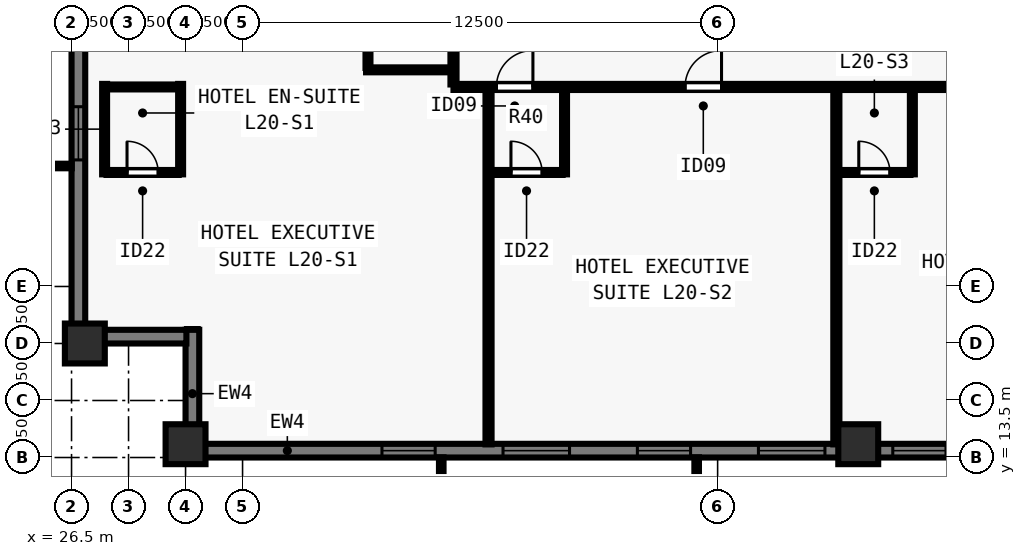
"""IFC4 building model, lengths in metres.
Left out: names, types, materials, properties, quantities, classifications, styles, units other than length and angle.
Written with IfcOpenShell. Run it as: python <this file> out.ifc"""

import sys

from ifc_helpers import new_model, si_unit, direction, frame, frame_2d, origin, origin_2d, place, context, subcontext, project, spatial, rectangle, extrude, element, fill, save


model = new_model("IFC4")
c1 = context("Model", 3, precision=1e-05, world=origin(), true_north=direction((0.0, 1.0)))
c2 = subcontext(c1, "Body", "Model", "MODEL_VIEW")
j1 = project(units=[si_unit("LENGTHUNIT", "METRE"), si_unit("PLANEANGLEUNIT", "RADIAN")], contexts=[c1])
p1 = place(None, origin())
s1 = spatial("IfcSite", under=j1, at=p1, CompositionType="ELEMENT")
p2 = place(p1, origin())
s2 = spatial("IfcBuilding", under=s1, at=p2, CompositionType="ELEMENT")
p3 = place(p2, frame((0.0, 0.0, 76.0)))
s3 = spatial("IfcBuildingStorey", under=s2, at=p3, CompositionType="ELEMENT", Elevation=76.0)
for number, where, z_axis, x_axis in (
    (1, (29.5, 13.85, 0.0), (0.0, 0.0, 1.0), (1.0, 0.0, 0.0)),
    (2, (47.2, 13.85, 0.0), (0.0, 0.0, 1.0), (1.0, 0.0, 0.0)),
    (3, (26.85, 16.5, 0.0), (0.0, 0.0, 1.0), (0.0, 1.0, 0.0)),
):
    element("IfcColumn", number, at=place(p3, frame(where, z_axis=z_axis, x_axis=x_axis)), inside=s3, PredefinedType="COLUMN", context=c2, shape_type="SweptSolid", body=[
        extrude(rectangle(XDim=1.05, YDim=1.05, at=origin_2d()), origin(), (0.0, 0.0, 1.0), 3.5),
    ])
p4 = place(p3, frame((74.5, 13.68, 0.0), z_axis=(0.0, 0.0, 1.0), x_axis=(-1.0, 0.0, 0.0)))
e4 = element("IfcWall", 4, at=p4, inside=s3, PredefinedType="SOLIDWALL", context=c2, shape_type="SweptSolid", body=[
    extrude(rectangle(XDim=44.662, YDim=0.36, at=frame_2d((22.331, 0.0))), origin(), (0.0, 0.0, 1.0), 3.28),
])
p5 = place(p4, frame((4.83, 0.0, 0.8)))
e5 = element("IfcOpeningElement", 5, at=p5, cuts=e4, PredefinedType="OPENING", context=c2, shape_type="SweptSolid", body=[
    extrude(rectangle(XDim=1.4, YDim=1.544, at=frame_2d((0.7, 0.772))), frame((0.0, 0.19, 0.0), z_axis=(0.0, -1.0, 0.0), x_axis=(1.0, 0.0, 0.0)), (0.0, 0.0, 1.0), 0.38),
])
p6 = place(p4, frame((8.465, 0.0, 0.8)))
e6 = element("IfcOpeningElement", 6, at=p6, cuts=e4, PredefinedType="OPENING", context=c2, shape_type="SweptSolid", body=[
    extrude(rectangle(XDim=1.75, YDim=1.544, at=frame_2d((0.875, 0.772))), frame((0.0, 0.19, 0.0), z_axis=(0.0, -1.0, 0.0), x_axis=(1.0, 0.0, 0.0)), (0.0, 0.0, 1.0), 0.38),
])
p7 = place(p4, frame((11.551, 0.0, 0.8)))
e7 = element("IfcOpeningElement", 7, at=p7, cuts=e4, PredefinedType="OPENING", context=c2, shape_type="SweptSolid", body=[
    extrude(rectangle(XDim=1.4, YDim=1.544, at=frame_2d((0.7, 0.772))), frame((0.0, 0.19, 0.0), z_axis=(0.0, -1.0, 0.0), x_axis=(1.0, 0.0, 0.0)), (0.0, 0.0, 1.0), 0.38),
])
p8 = place(p4, frame((14.736, 0.0, 0.8)))
e8 = element("IfcOpeningElement", 8, at=p8, cuts=e4, PredefinedType="OPENING", context=c2, shape_type="SweptSolid", body=[
    extrude(rectangle(XDim=1.75, YDim=1.544, at=frame_2d((0.875, 0.772))), frame((0.0, 0.19, 0.0), z_axis=(0.0, -1.0, 0.0), x_axis=(1.0, 0.0, 0.0)), (0.0, 0.0, 1.0), 0.38),
])
p9 = place(p4, frame((18.721, 0.0, 0.8)))
e9 = element("IfcOpeningElement", 9, at=p9, cuts=e4, PredefinedType="OPENING", context=c2, shape_type="SweptSolid", body=[
    extrude(rectangle(XDim=1.4, YDim=1.544, at=frame_2d((0.7, 0.772))), frame((0.0, 0.19, 0.0), z_axis=(0.0, -1.0, 0.0), x_axis=(1.0, 0.0, 0.0)), (0.0, 0.0, 1.0), 0.38),
])
p10 = place(p4, frame((21.456, 0.0, 0.8)))
e10 = element("IfcOpeningElement", 10, at=p10, cuts=e4, PredefinedType="OPENING", context=c2, shape_type="SweptSolid", body=[
    extrude(rectangle(XDim=1.75, YDim=1.544, at=frame_2d((0.875, 0.772))), frame((0.0, 0.19, 0.0), z_axis=(0.0, -1.0, 0.0), x_axis=(1.0, 0.0, 0.0)), (0.0, 0.0, 1.0), 0.38),
])
p11 = place(p4, frame((24.991, 0.0, 0.8)))
e11 = element("IfcOpeningElement", 11, at=p11, cuts=e4, PredefinedType="OPENING", context=c2, shape_type="SweptSolid", body=[
    extrude(rectangle(XDim=1.4, YDim=1.544, at=frame_2d((0.7, 0.772))), frame((0.0, 0.19, 0.0), z_axis=(0.0, -1.0, 0.0), x_axis=(1.0, 0.0, 0.0)), (0.0, 0.0, 1.0), 0.38),
])
p12 = place(p4, frame((28.177, 0.0, 0.8)))
e12 = element("IfcOpeningElement", 12, at=p12, cuts=e4, PredefinedType="OPENING", context=c2, shape_type="SweptSolid", body=[
    extrude(rectangle(XDim=1.75, YDim=1.544, at=frame_2d((0.875, 0.772))), frame((0.0, 0.19, 0.0), z_axis=(0.0, -1.0, 0.0), x_axis=(1.0, 0.0, 0.0)), (0.0, 0.0, 1.0), 0.38),
])
p13 = place(p4, frame((31.711, 0.0, 0.8)))
e13 = element("IfcOpeningElement", 13, at=p13, cuts=e4, PredefinedType="OPENING", context=c2, shape_type="SweptSolid", body=[
    extrude(rectangle(XDim=1.4, YDim=1.544, at=frame_2d((0.7, 0.772))), frame((0.0, 0.19, 0.0), z_axis=(0.0, -1.0, 0.0), x_axis=(1.0, 0.0, 0.0)), (0.0, 0.0, 1.0), 0.38),
])
p14 = place(p4, frame((34.897, 0.0, 0.8)))
e14 = element("IfcOpeningElement", 14, at=p14, cuts=e4, PredefinedType="OPENING", context=c2, shape_type="SweptSolid", body=[
    extrude(rectangle(XDim=1.75, YDim=1.544, at=frame_2d((0.875, 0.772))), frame((0.0, 0.19, 0.0), z_axis=(0.0, -1.0, 0.0), x_axis=(1.0, 0.0, 0.0)), (0.0, 0.0, 1.0), 0.38),
])
p15 = place(p4, frame((38.432, 0.0, 0.8)))
e15 = element("IfcOpeningElement", 15, at=p15, cuts=e4, PredefinedType="OPENING", context=c2, shape_type="SweptSolid", body=[
    extrude(rectangle(XDim=1.4, YDim=1.544, at=frame_2d((0.7, 0.772))), frame((0.0, 0.19, 0.0), z_axis=(0.0, -1.0, 0.0), x_axis=(1.0, 0.0, 0.0)), (0.0, 0.0, 1.0), 0.38),
])
p16 = place(p3, frame((29.68, 13.5, 0.0), z_axis=(0.0, 0.0, 1.0), x_axis=(0.0, 1.0, 0.0)))
e16 = element("IfcWall", 16, at=p16, inside=s3, PredefinedType="SOLIDWALL", context=c2, shape_type="SweptSolid", body=[
    extrude(rectangle(XDim=3.36, YDim=0.36, at=frame_2d((1.68, 0.0))), origin(), (0.0, 0.0, 1.0), 3.28),
])
p17 = place(p3, frame((29.522, 16.68, 0.0), z_axis=(0.0, 0.0, 1.0), x_axis=(-1.0, 0.0, 0.0)))
e17 = element("IfcWall", 17, at=p17, inside=s3, PredefinedType="SOLIDWALL", context=c2, shape_type="SweptSolid", body=[
    extrude(rectangle(XDim=2.684, YDim=0.36, at=frame_2d((1.342, 0.0))), origin(), (0.0, 0.0, 1.0), 3.28),
])
p18 = place(p3, frame((26.68, 16.5, 0.0), z_axis=(0.0, 0.0, 1.0), x_axis=(0.0, 1.0, 0.0)))
e18 = element("IfcWall", 18, at=p18, inside=s3, PredefinedType="SOLIDWALL", context=c2, shape_type="SweptSolid", body=[
    extrude(rectangle(XDim=44.662, YDim=0.36, at=frame_2d((22.331, 0.0))), origin(), (0.0, 0.0, 1.0), 3.28),
])
p19 = place(p18, frame((4.83, 0.0, 0.8)))
e19 = element("IfcOpeningElement", 19, at=p19, cuts=e18, PredefinedType="OPENING", context=c2, shape_type="SweptSolid", body=[
    extrude(rectangle(XDim=1.4, YDim=1.544, at=frame_2d((0.7, 0.772))), frame((0.0, 0.19, 0.0), z_axis=(0.0, -1.0, 0.0), x_axis=(1.0, 0.0, 0.0)), (0.0, 0.0, 1.0), 0.38),
])
p20 = place(p18, frame((8.015, 0.0, 0.8)))
e20 = element("IfcOpeningElement", 20, at=p20, cuts=e18, PredefinedType="OPENING", context=c2, shape_type="SweptSolid", body=[
    extrude(rectangle(XDim=1.75, YDim=1.544, at=frame_2d((0.875, 0.772))), frame((0.0, 0.19, 0.0), z_axis=(0.0, -1.0, 0.0), x_axis=(1.0, 0.0, 0.0)), (0.0, 0.0, 1.0), 0.38),
])
p21 = place(p18, frame((11.551, 0.0, 0.8)))
e21 = element("IfcOpeningElement", 21, at=p21, cuts=e18, PredefinedType="OPENING", context=c2, shape_type="SweptSolid", body=[
    extrude(rectangle(XDim=1.4, YDim=1.544, at=frame_2d((0.7, 0.772))), frame((0.0, 0.19, 0.0), z_axis=(0.0, -1.0, 0.0), x_axis=(1.0, 0.0, 0.0)), (0.0, 0.0, 1.0), 0.38),
])
p22 = place(p18, frame((18.721, 0.0, 0.8)))
e22 = element("IfcOpeningElement", 22, at=p22, cuts=e18, PredefinedType="OPENING", context=c2, shape_type="SweptSolid", body=[
    extrude(rectangle(XDim=1.4, YDim=1.544, at=frame_2d((0.7, 0.772))), frame((0.0, 0.19, 0.0), z_axis=(0.0, -1.0, 0.0), x_axis=(1.0, 0.0, 0.0)), (0.0, 0.0, 1.0), 0.38),
])
p23 = place(p18, frame((22.706, 0.0, 0.8)))
e23 = element("IfcOpeningElement", 23, at=p23, cuts=e18, PredefinedType="OPENING", context=c2, shape_type="SweptSolid", body=[
    extrude(rectangle(XDim=1.75, YDim=1.544, at=frame_2d((0.875, 0.772))), frame((0.0, 0.19, 0.0), z_axis=(0.0, -1.0, 0.0), x_axis=(1.0, 0.0, 0.0)), (0.0, 0.0, 1.0), 0.38),
])
p24 = place(p18, frame((24.991, 0.0, 0.8)))
e24 = element("IfcOpeningElement", 24, at=p24, cuts=e18, PredefinedType="OPENING", context=c2, shape_type="SweptSolid", body=[
    extrude(rectangle(XDim=1.4, YDim=1.544, at=frame_2d((0.7, 0.772))), frame((0.0, 0.19, 0.0), z_axis=(0.0, -1.0, 0.0), x_axis=(1.0, 0.0, 0.0)), (0.0, 0.0, 1.0), 0.38),
])
p25 = place(p18, frame((28.177, 0.0, 0.8)))
e25 = element("IfcOpeningElement", 25, at=p25, cuts=e18, PredefinedType="OPENING", context=c2, shape_type="SweptSolid", body=[
    extrude(rectangle(XDim=1.75, YDim=1.544, at=frame_2d((0.875, 0.772))), frame((0.0, 0.19, 0.0), z_axis=(0.0, -1.0, 0.0), x_axis=(1.0, 0.0, 0.0)), (0.0, 0.0, 1.0), 0.38),
])
p26 = place(p18, frame((31.711, 0.0, 0.8)))
e26 = element("IfcOpeningElement", 26, at=p26, cuts=e18, PredefinedType="OPENING", context=c2, shape_type="SweptSolid", body=[
    extrude(rectangle(XDim=1.4, YDim=1.544, at=frame_2d((0.7, 0.772))), frame((0.0, 0.19, 0.0), z_axis=(0.0, -1.0, 0.0), x_axis=(1.0, 0.0, 0.0)), (0.0, 0.0, 1.0), 0.38),
])
p27 = place(p18, frame((34.897, 0.0, 0.8)))
e27 = element("IfcOpeningElement", 27, at=p27, cuts=e18, PredefinedType="OPENING", context=c2, shape_type="SweptSolid", body=[
    extrude(rectangle(XDim=1.75, YDim=1.544, at=frame_2d((0.875, 0.772))), frame((0.0, 0.19, 0.0), z_axis=(0.0, -1.0, 0.0), x_axis=(1.0, 0.0, 0.0)), (0.0, 0.0, 1.0), 0.38),
])
p28 = place(p3, frame((36.55, 23.25, 0.0), z_axis=(0.0, 0.0, 1.0), x_axis=(1.0, 0.0, 0.0)))
e28 = element("IfcWall", 28, at=p28, inside=s3, PredefinedType="PARTITIONING", context=c2, shape_type="SweptSolid", body=[
    extrude(rectangle(XDim=30.9, YDim=0.16, at=frame_2d((15.45, 0.0))), origin(), (0.0, 0.0, 1.0), 3.28),
])
p29 = place(p28, frame((1.13, 0.0, 0.0)))
e29 = element("IfcOpeningElement", 29, at=p29, cuts=e28, PredefinedType="OPENING", context=c2, shape_type="SweptSolid", body=[
    extrude(rectangle(XDim=0.96, YDim=2.15, at=frame_2d((0.48, 1.075))), frame((0.0, 0.09, 0.0), z_axis=(0.0, -1.0, 0.0), x_axis=(1.0, 0.0, 0.0)), (0.0, 0.0, 1.0), 0.18),
])
p30 = place(p28, frame((6.093, 0.0, 0.0)))
e30 = element("IfcOpeningElement", 30, at=p30, cuts=e28, PredefinedType="OPENING", context=c2, shape_type="SweptSolid", body=[
    extrude(rectangle(XDim=0.96, YDim=2.15, at=frame_2d((0.48, 1.075))), frame((0.0, 0.09, 0.0), z_axis=(0.0, -1.0, 0.0), x_axis=(1.0, 0.0, 0.0)), (0.0, 0.0, 1.0), 0.18),
])
p31 = place(p28, frame((16.125, 0.0, 0.0)))
e31 = element("IfcOpeningElement", 31, at=p31, cuts=e28, PredefinedType="OPENING", context=c2, shape_type="SweptSolid", body=[
    extrude(rectangle(XDim=0.96, YDim=2.15, at=frame_2d((0.48, 1.075))), frame((0.0, 0.09, 0.0), z_axis=(0.0, -1.0, 0.0), x_axis=(1.0, 0.0, 0.0)), (0.0, 0.0, 1.0), 0.18),
])
p32 = place(p28, frame((26.157, 0.0, 0.0)))
e32 = element("IfcOpeningElement", 32, at=p32, cuts=e28, PredefinedType="OPENING", context=c2, shape_type="SweptSolid", body=[
    extrude(rectangle(XDim=0.96, YDim=2.15, at=frame_2d((0.48, 1.075))), frame((0.0, 0.09, 0.0), z_axis=(0.0, -1.0, 0.0), x_axis=(1.0, 0.0, 0.0)), (0.0, 0.0, 1.0), 0.18),
])
p33 = place(p28, frame((28.92, 0.0, 0.0)))
e33 = element("IfcOpeningElement", 33, at=p33, cuts=e28, PredefinedType="OPENING", context=c2, shape_type="SweptSolid", body=[
    extrude(rectangle(XDim=0.96, YDim=2.15, at=frame_2d((0.48, 1.075))), frame((0.0, 0.09, 0.0), z_axis=(0.0, -1.0, 0.0), x_axis=(1.0, 0.0, 0.0)), (0.0, 0.0, 1.0), 0.18),
])
p34 = place(p3, frame((36.55, 23.315, 0.0), z_axis=(0.0, 0.0, 1.0), x_axis=(0.0, 1.0, 0.0)))
e34 = element("IfcWall", 34, at=p34, inside=s3, PredefinedType="PARTITIONING", context=c2, shape_type="SweptSolid", body=[
    extrude(rectangle(XDim=31.37, YDim=0.16, at=frame_2d((15.685, 0.0))), origin(), (0.0, 0.0, 1.0), 3.28),
])
p35 = place(p34, frame((4.848, 0.0, 0.0)))
e35 = element("IfcOpeningElement", 35, at=p35, cuts=e34, PredefinedType="OPENING", context=c2, shape_type="SweptSolid", body=[
    extrude(rectangle(XDim=0.96, YDim=2.15, at=frame_2d((0.48, 1.075))), frame((0.0, 0.09, 0.0), z_axis=(0.0, -1.0, 0.0), x_axis=(1.0, 0.0, 0.0)), (0.0, 0.0, 1.0), 0.18),
])
p36 = place(p34, frame((12.39, 0.0, 0.0)))
e36 = element("IfcOpeningElement", 36, at=p36, cuts=e34, PredefinedType="OPENING", context=c2, shape_type="SweptSolid", body=[
    extrude(rectangle(XDim=0.96, YDim=2.15, at=frame_2d((0.48, 1.075))), frame((0.0, 0.09, 0.0), z_axis=(0.0, -1.0, 0.0), x_axis=(1.0, 0.0, 0.0)), (0.0, 0.0, 1.0), 0.18),
])
p37 = place(p34, frame((20.265, 0.0, 0.0)))
e37 = element("IfcOpeningElement", 37, at=p37, cuts=e34, PredefinedType="OPENING", context=c2, shape_type="SweptSolid", body=[
    extrude(rectangle(XDim=0.96, YDim=2.15, at=frame_2d((0.48, 1.075))), frame((0.0, 0.09, 0.0), z_axis=(0.0, -1.0, 0.0), x_axis=(1.0, 0.0, 0.0)), (0.0, 0.0, 1.0), 0.18),
])
p38 = place(p34, frame((28.223, 0.0, 0.0)))
e38 = element("IfcOpeningElement", 38, at=p38, cuts=e34, PredefinedType="OPENING", context=c2, shape_type="SweptSolid", body=[
    extrude(rectangle(XDim=0.96, YDim=2.15, at=frame_2d((0.48, 1.075))), frame((0.0, 0.09, 0.0), z_axis=(0.0, -1.0, 0.0), x_axis=(1.0, 0.0, 0.0)), (0.0, 0.0, 1.0), 0.18),
])
for number, where, z_axis, x_axis in (
    (39, (27.37, 20.95, 0.0), (0.0, 0.0, 1.0), (0.0, 1.0, 0.0)),
    (40, (29.37, 20.95, 0.0), (0.0, 0.0, 1.0), (0.0, 1.0, 0.0)),
):
    element("IfcWall", number, at=place(p3, frame(where, z_axis=z_axis, x_axis=x_axis)), inside=s3, PredefinedType="PLUMBINGWALL", context=c2, shape_type="SweptSolid", body=[
        extrude(rectangle(XDim=2.38, YDim=0.13, at=frame_2d((1.19, 0.0))), origin(), (0.0, 0.0, 1.0), 3.28),
    ])
p39 = place(p3, frame((27.42, 21.0, 0.0), z_axis=(0.0, 0.0, 1.0), x_axis=(1.0, 0.0, 0.0)))
e41 = element("IfcWall", 41, at=p39, inside=s3, PredefinedType="PLUMBINGWALL", context=c2, shape_type="SweptSolid", body=[
    extrude(rectangle(XDim=1.9, YDim=0.13, at=frame_2d((0.95, 0.0))), origin(), (0.0, 0.0, 1.0), 3.28),
])
p40 = place(p39, frame((0.54, 0.0, 0.0)))
e42 = element("IfcOpeningElement", 42, at=p40, cuts=e41, PredefinedType="OPENING", context=c2, shape_type="SweptSolid", body=[
    extrude(rectangle(XDim=0.82, YDim=2.1, at=frame_2d((0.41, 1.05))), frame((0.0, 0.075, 0.0), z_axis=(0.0, -1.0, 0.0), x_axis=(1.0, 0.0, 0.0)), (0.0, 0.0, 1.0), 0.15),
])
p41 = place(p3, frame((27.42, 23.25, 0.0), z_axis=(0.0, 0.0, 1.0), x_axis=(1.0, 0.0, 0.0)))
e43 = element("IfcWall", 43, at=p41, inside=s3, PredefinedType="PLUMBINGWALL", context=c2, shape_type="SweptSolid", body=[
    extrude(rectangle(XDim=1.9, YDim=0.13, at=frame_2d((0.95, 0.0))), origin(), (0.0, 0.0, 1.0), 3.28),
])
p42 = place(p3, frame((37.472, 13.845, 0.0), z_axis=(0.0, 0.0, 1.0), x_axis=(0.0, 1.0, 0.0)))
e44 = element("IfcWall", 44, at=p42, inside=s3, PredefinedType="PARTITIONING", context=c2, shape_type="SweptSolid", body=[
    extrude(rectangle(XDim=9.34, YDim=0.16, at=frame_2d((4.67, 0.0))), origin(), (0.0, 0.0, 1.0), 3.28),
])
p43 = place(p3, frame((39.472, 20.95, 0.0), z_axis=(0.0, 0.0, 1.0), x_axis=(0.0, 1.0, 0.0)))
e45 = element("IfcWall", 45, at=p43, inside=s3, PredefinedType="PLUMBINGWALL", context=c2, shape_type="SweptSolid", body=[
    extrude(rectangle(XDim=2.235, YDim=0.13, at=frame_2d((1.118, 0.0))), origin(), (0.0, 0.0, 1.0), 3.28),
])
p44 = place(p3, frame((37.537, 21.0, 0.0), z_axis=(0.0, 0.0, 1.0), x_axis=(1.0, 0.0, 0.0)))
e46 = element("IfcWall", 46, at=p44, inside=s3, PredefinedType="PLUMBINGWALL", context=c2, shape_type="SweptSolid", body=[
    extrude(rectangle(XDim=1.885, YDim=0.13, at=frame_2d((0.942, 0.0))), origin(), (0.0, 0.0, 1.0), 3.28),
])
p45 = place(p44, frame((0.525, 0.0, 0.0)))
e47 = element("IfcOpeningElement", 47, at=p45, cuts=e46, PredefinedType="OPENING", context=c2, shape_type="SweptSolid", body=[
    extrude(rectangle(XDim=0.82, YDim=2.1, at=frame_2d((0.41, 1.05))), frame((0.0, 0.075, 0.0), z_axis=(0.0, -1.0, 0.0), x_axis=(1.0, 0.0, 0.0)), (0.0, 0.0, 1.0), 0.15),
])
p46 = place(p3, frame((46.624, 13.845, 0.0), z_axis=(0.0, 0.0, 1.0), x_axis=(0.0, 1.0, 0.0)))
e48 = element("IfcWall", 48, at=p46, inside=s3, PredefinedType="PARTITIONING", context=c2, shape_type="SweptSolid", body=[
    extrude(rectangle(XDim=9.34, YDim=0.16, at=frame_2d((4.67, 0.0))), origin(), (0.0, 0.0, 1.0), 3.28),
])
p47 = place(p3, frame((48.624, 20.95, 0.0), z_axis=(0.0, 0.0, 1.0), x_axis=(0.0, 1.0, 0.0)))
e49 = element("IfcWall", 49, at=p47, inside=s3, PredefinedType="PLUMBINGWALL", context=c2, shape_type="SweptSolid", body=[
    extrude(rectangle(XDim=2.235, YDim=0.13, at=frame_2d((1.118, 0.0))), origin(), (0.0, 0.0, 1.0), 3.28),
])
p48 = place(p3, frame((46.689, 21.0, 0.0), z_axis=(0.0, 0.0, 1.0), x_axis=(1.0, 0.0, 0.0)))
e50 = element("IfcWall", 50, at=p48, inside=s3, PredefinedType="PLUMBINGWALL", context=c2, shape_type="SweptSolid", body=[
    extrude(rectangle(XDim=1.885, YDim=0.13, at=frame_2d((0.942, 0.0))), origin(), (0.0, 0.0, 1.0), 3.28),
])
p49 = place(p48, frame((0.525, 0.0, 0.0)))
e51 = element("IfcOpeningElement", 51, at=p49, cuts=e50, PredefinedType="OPENING", context=c2, shape_type="SweptSolid", body=[
    extrude(rectangle(XDim=0.82, YDim=2.1, at=frame_2d((0.41, 1.05))), frame((0.0, 0.075, 0.0), z_axis=(0.0, -1.0, 0.0), x_axis=(1.0, 0.0, 0.0)), (0.0, 0.0, 1.0), 0.15),
])
p50 = place(p3, frame((34.25, 23.7, 0.0), z_axis=(0.0, 0.0, 1.0), x_axis=(1.0, 0.0, 0.0)))
e52 = element("IfcWall", 52, at=p50, inside=s3, PredefinedType="PLUMBINGWALL", context=c2, shape_type="SweptSolid", body=[
    extrude(rectangle(XDim=2.235, YDim=0.13, at=frame_2d((1.118, 0.0))), origin(), (0.0, 0.0, 1.0), 2.849),
])
p51 = place(p3, frame((34.3, 23.75, 0.0), z_axis=(0.0, 0.0, 1.0), x_axis=(0.0, 1.0, 0.0)))
e53 = element("IfcWall", 53, at=p51, inside=s3, PredefinedType="PLUMBINGWALL", context=c2, shape_type="SweptSolid", body=[
    extrude(rectangle(XDim=1.9, YDim=0.13, at=frame_2d((0.95, 0.0))), origin(), (0.0, 0.0, 1.0), 3.28),
])
p52 = place(p51, frame((0.54, 0.0, 0.0)))
e54 = element("IfcOpeningElement", 54, at=p52, cuts=e53, PredefinedType="OPENING", context=c2, shape_type="SweptSolid", body=[
    extrude(rectangle(XDim=0.82, YDim=2.1, at=frame_2d((0.41, 1.05))), frame((0.0, 0.075, 0.0), z_axis=(0.0, -1.0, 0.0), x_axis=(1.0, 0.0, 0.0)), (0.0, 0.0, 1.0), 0.15),
])
p53 = place(p11, origin())
e55 = element("IfcWindow", 55, at=p53, inside=s3, PartitioningType="SINGLE_PANEL", PredefinedType="WINDOW", context=c2, shape_type="SweptSolid", body=[
    extrude(rectangle(XDim=1.4, YDim=1.544, at=frame_2d((0.7, 0.772))), frame((0.0, -0.05, 0.0), z_axis=(0.0, -1.0, 0.0), x_axis=(1.0, 0.0, 0.0)), (0.0, 0.0, 1.0), 0.06),
])
fill(e11, e55)
p54 = place(p12, origin())
e56 = element("IfcWindow", 56, at=p54, inside=s3, PartitioningType="SINGLE_PANEL", PredefinedType="WINDOW", context=c2, shape_type="SweptSolid", body=[
    extrude(rectangle(XDim=1.75, YDim=1.544, at=frame_2d((0.875, 0.772))), frame((0.0, -0.05, 0.0), z_axis=(0.0, -1.0, 0.0), x_axis=(1.0, 0.0, 0.0)), (0.0, 0.0, 1.0), 0.06),
])
fill(e12, e56)
p55 = place(p13, origin())
e57 = element("IfcWindow", 57, at=p55, inside=s3, PartitioningType="SINGLE_PANEL", PredefinedType="WINDOW", context=c2, shape_type="SweptSolid", body=[
    extrude(rectangle(XDim=1.4, YDim=1.544, at=frame_2d((0.7, 0.772))), frame((0.0, -0.05, 0.0), z_axis=(0.0, -1.0, 0.0), x_axis=(1.0, 0.0, 0.0)), (0.0, 0.0, 1.0), 0.06),
])
fill(e13, e57)
p56 = place(p14, origin())
e58 = element("IfcWindow", 58, at=p56, inside=s3, PartitioningType="SINGLE_PANEL", PredefinedType="WINDOW", context=c2, shape_type="SweptSolid", body=[
    extrude(rectangle(XDim=1.75, YDim=1.544, at=frame_2d((0.875, 0.772))), frame((0.0, -0.05, 0.0), z_axis=(0.0, -1.0, 0.0), x_axis=(1.0, 0.0, 0.0)), (0.0, 0.0, 1.0), 0.06),
])
fill(e14, e58)
p57 = place(p15, origin())
e59 = element("IfcWindow", 59, at=p57, inside=s3, PartitioningType="SINGLE_PANEL", PredefinedType="WINDOW", context=c2, shape_type="SweptSolid", body=[
    extrude(rectangle(XDim=1.4, YDim=1.544, at=frame_2d((0.7, 0.772))), frame((0.0, -0.05, 0.0), z_axis=(0.0, -1.0, 0.0), x_axis=(1.0, 0.0, 0.0)), (0.0, 0.0, 1.0), 0.06),
])
fill(e15, e59)
p58 = place(p19, origin())
e60 = element("IfcWindow", 60, at=p58, inside=s3, PartitioningType="SINGLE_PANEL", PredefinedType="WINDOW", context=c2, shape_type="SweptSolid", body=[
    extrude(rectangle(XDim=1.4, YDim=1.544, at=frame_2d((0.7, 0.772))), frame((0.0, -0.05, 0.0), z_axis=(0.0, -1.0, 0.0), x_axis=(1.0, 0.0, 0.0)), (0.0, 0.0, 1.0), 0.06),
])
fill(e19, e60)
p59 = place(p40, origin())
e61 = element("IfcDoor", 61, at=p59, inside=s3, OperationType="SINGLE_SWING_LEFT", PredefinedType="DOOR", context=c2, shape_type="SweptSolid", body=[
    extrude(rectangle(XDim=0.82, YDim=2.1, at=frame_2d((0.41, 1.05))), frame((0.0, 0.025, 0.0), z_axis=(0.0, -1.0, 0.0), x_axis=(1.0, 0.0, 0.0)), (0.0, 0.0, 1.0), 0.05),
])
fill(e42, e61)
p60 = place(p29, origin())
e62 = element("IfcDoor", 62, at=p60, inside=s3, OperationType="SINGLE_SWING_RIGHT", PredefinedType="DOOR", context=c2, shape_type="SweptSolid", body=[
    extrude(rectangle(XDim=0.96, YDim=2.15, at=frame_2d((0.48, 1.075))), frame((0.0, 0.025, 0.0), z_axis=(0.0, -1.0, 0.0), x_axis=(1.0, 0.0, 0.0)), (0.0, 0.0, 1.0), 0.05),
])
fill(e29, e62)
p61 = place(p45, origin())
e63 = element("IfcDoor", 63, at=p61, inside=s3, OperationType="SINGLE_SWING_LEFT", PredefinedType="DOOR", context=c2, shape_type="SweptSolid", body=[
    extrude(rectangle(XDim=0.82, YDim=2.1, at=frame_2d((0.41, 1.05))), frame((0.0, 0.025, 0.0), z_axis=(0.0, -1.0, 0.0), x_axis=(1.0, 0.0, 0.0)), (0.0, 0.0, 1.0), 0.05),
])
fill(e47, e63)
p62 = place(p30, origin())
e64 = element("IfcDoor", 64, at=p62, inside=s3, OperationType="SINGLE_SWING_RIGHT", PredefinedType="DOOR", context=c2, shape_type="SweptSolid", body=[
    extrude(rectangle(XDim=0.96, YDim=2.15, at=frame_2d((0.48, 1.075))), frame((0.0, 0.025, 0.0), z_axis=(0.0, -1.0, 0.0), x_axis=(1.0, 0.0, 0.0)), (0.0, 0.0, 1.0), 0.05),
])
fill(e30, e64)
p63 = place(p49, origin())
e65 = element("IfcDoor", 65, at=p63, inside=s3, OperationType="SINGLE_SWING_LEFT", PredefinedType="DOOR", context=c2, shape_type="SweptSolid", body=[
    extrude(rectangle(XDim=0.82, YDim=2.1, at=frame_2d((0.41, 1.05))), frame((0.0, 0.025, 0.0), z_axis=(0.0, -1.0, 0.0), x_axis=(1.0, 0.0, 0.0)), (0.0, 0.0, 1.0), 0.05),
])
fill(e51, e65)
save(model, sys.argv[1])
